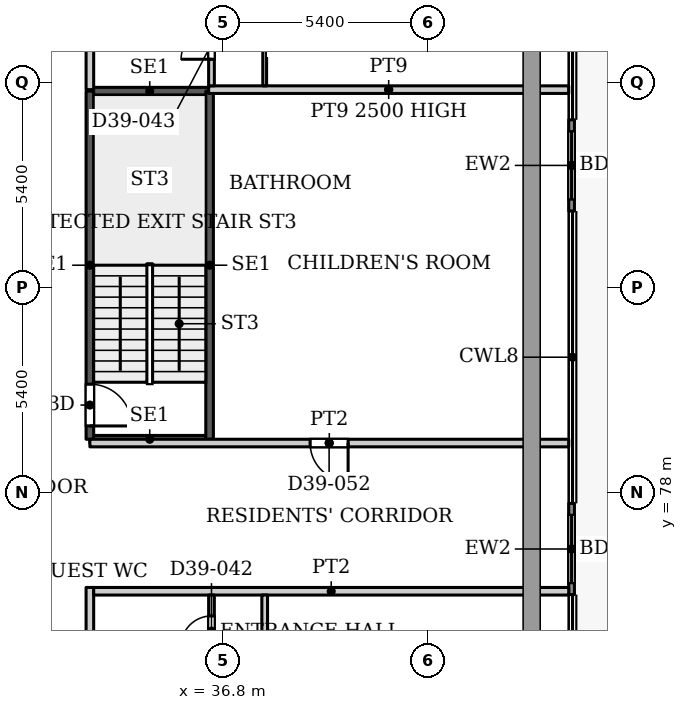
"""IFC4 building model, lengths in metres.
Left out: names, types, materials, properties, quantities, classifications, styles, units other than length and angle.
Written with IfcOpenShell. Run it as: python <this file> out.ifc"""

import sys

from ifc_helpers import new_model, si_unit, direction, frame, frame_2d, origin, place, context, subcontext, project, spatial, rectangle, extrude, source, transform, mapped, element, fill, save


model = new_model("IFC4")
c1 = context("Model", 3, precision=1e-05, world=origin(), true_north=direction((0.0, 1.0)))
c2 = subcontext(c1, "Body", "Model", "MODEL_VIEW")
j1 = project(units=[si_unit("LENGTHUNIT", "METRE"), si_unit("PLANEANGLEUNIT", "RADIAN")], contexts=[c1])
p1 = place(None, origin())
s1 = spatial("IfcSite", under=j1, at=p1, CompositionType="ELEMENT")
p2 = place(p1, origin())
s2 = spatial("IfcBuilding", under=s1, at=p2, CompositionType="ELEMENT")
p3 = place(p2, frame((0.0, 0.0, 172.1)))
s3 = spatial("IfcBuildingStorey", under=s2, at=p3, CompositionType="ELEMENT", Elevation=172.1)
p4 = place(p3, frame((45.975, 87.806, 0.0), z_axis=(0.0, 0.0, 1.0), x_axis=(0.0, -1.0, 0.0)))
e1 = element("IfcWall", 1, at=p4, inside=s3, PredefinedType="SOLIDWALL", context=c2, shape_type="SweptSolid", body=[
    extrude(rectangle(XDim=2.4, YDim=0.15, at=frame_2d((1.2, 0.0))), origin(), (0.0, 0.0, 1.0), 3.75),
])
p5 = place(p4, frame((0.3, 0.0, 0.0)))
e2 = element("IfcOpeningElement", 2, at=p5, cuts=e1, PredefinedType="OPENING", context=c2, shape_type="SweptSolid", body=[
    extrude(rectangle(XDim=1.8, YDim=2.4, at=frame_2d((0.9, 1.2))), frame((0.0, 0.085, 0.0), z_axis=(0.0, -1.0, 0.0), x_axis=(1.0, 0.0, 0.0)), (0.0, 0.0, 1.0), 0.17),
])
p6 = place(p3, frame((45.975, 77.712, 0.0), z_axis=(0.0, 0.0, 1.0), x_axis=(0.0, -1.0, 0.0)))
e3 = element("IfcWall", 3, at=p6, inside=s3, PredefinedType="SOLIDWALL", context=c2, shape_type="SweptSolid", body=[
    extrude(rectangle(XDim=2.4, YDim=0.15, at=frame_2d((1.2, 0.0))), origin(), (0.0, 0.0, 1.0), 3.75),
])
p7 = place(p6, frame((0.3, 0.0, 0.0)))
e4 = element("IfcOpeningElement", 4, at=p7, cuts=e3, PredefinedType="OPENING", context=c2, shape_type="SweptSolid", body=[
    extrude(rectangle(XDim=1.8, YDim=2.4, at=frame_2d((0.9, 1.2))), frame((0.0, 0.085, 0.0), z_axis=(0.0, -1.0, 0.0), x_axis=(1.0, 0.0, 0.0)), (0.0, 0.0, 1.0), 0.17),
])
for number, where, z_axis, x_axis in (
    (5, (33.3, 79.4, 0.0), (0.0, 0.0, 1.0), (1.0, 0.0, 0.0)),
    (6, (33.3, 88.56, 0.0), (0.0, 0.0, 1.0), (1.0, 0.0, 0.0)),
):
    element("IfcWall", number, at=place(p3, frame(where, z_axis=z_axis, x_axis=x_axis)), inside=s3, PredefinedType="SHEAR", context=c2, shape_type="SweptSolid", body=[
        extrude(rectangle(XDim=3.15, YDim=0.2, at=frame_2d((1.575, 0.0))), origin(), (0.0, 0.0, 1.0), 3.9),
    ])
p8 = place(p3, frame((33.3, 79.4, 0.0), z_axis=(0.0, 0.0, 1.0), x_axis=(0.0, 1.0, 0.0)))
e7 = element("IfcWall", 7, at=p8, inside=s3, PredefinedType="SHEAR", context=c2, shape_type="SweptSolid", body=[
    extrude(rectangle(XDim=9.16, YDim=0.2, at=frame_2d((4.58, 0.0))), origin(), (0.0, 0.0, 1.0), 3.9),
])
p9 = place(p8, frame((0.35, 0.0, 0.0)))
e8 = element("IfcOpeningElement", 8, at=p9, cuts=e7, PredefinedType="OPENING", context=c2, shape_type="SweptSolid", body=[
    extrude(rectangle(XDim=1.1, YDim=2.2, at=frame_2d((0.55, 1.1))), frame((0.0, 0.11, 0.0), z_axis=(0.0, -1.0, 0.0), x_axis=(1.0, 0.0, 0.0)), (0.0, 0.0, 1.0), 0.22),
])
p10 = place(p3, frame((36.45, 79.4, 0.0), z_axis=(0.0, 0.0, 1.0), x_axis=(0.0, 1.0, 0.0)))
e9 = element("IfcWall", 9, at=p10, inside=s3, PredefinedType="SHEAR", context=c2, shape_type="SweptSolid", body=[
    extrude(rectangle(XDim=9.16, YDim=0.2, at=frame_2d((4.58, 0.0))), origin(), (0.0, 0.0, 1.0), 3.9),
])
p11 = place(p3, frame((33.3, 57.9, 0.0), z_axis=(0.0, 0.0, 1.0), x_axis=(0.0, 1.0, 0.0)))
e10 = element("IfcWall", 10, at=p11, inside=s3, PredefinedType="PARTITIONING", context=c2, shape_type="SweptSolid", body=[
    extrude(rectangle(XDim=17.6, YDim=0.2, at=frame_2d((8.8, 0.0))), origin(), (0.0, 0.0, 1.0), 3.6),
])
p12 = place(p11, frame((6.8, 0.0, 0.0)))
e11 = element("IfcOpeningElement", 11, at=p12, cuts=e10, PredefinedType="OPENING", context=c2, shape_type="SweptSolid", body=[
    extrude(rectangle(XDim=1.0, YDim=2.1, at=frame_2d((0.5, 1.05))), frame((0.0, 0.11, 0.0), z_axis=(0.0, -1.0, 0.0), x_axis=(1.0, 0.0, 0.0)), (0.0, 0.0, 1.0), 0.22),
])
p13 = place(p3, frame((33.3, 79.3, 0.0), z_axis=(0.0, 0.0, 1.0), x_axis=(1.0, 0.0, 0.0)))
e12 = element("IfcWall", 12, at=p13, inside=s3, PredefinedType="PARTITIONING", context=c2, shape_type="SweptSolid", body=[
    extrude(rectangle(XDim=12.6, YDim=0.2, at=frame_2d((6.3, 0.0))), origin(), (0.0, 0.0, 1.0), 3.6),
])
p14 = place(p13, frame((5.795, 0.0, 0.0)))
e13 = element("IfcOpeningElement", 13, at=p14, cuts=e12, PredefinedType="OPENING", context=c2, shape_type="SweptSolid", body=[
    extrude(rectangle(XDim=1.0, YDim=2.1, at=frame_2d((0.5, 1.05))), frame((0.0, 0.11, 0.0), z_axis=(0.0, -1.0, 0.0), x_axis=(1.0, 0.0, 0.0)), (0.0, 0.0, 1.0), 0.22),
])
p15 = place(p3, frame((33.3, 88.6, 0.0), z_axis=(0.0, 0.0, 1.0), x_axis=(0.0, 1.0, 0.0)))
e14 = element("IfcWall", 14, at=p15, inside=s3, PredefinedType="PARTITIONING", context=c2, shape_type="SweptSolid", body=[
    extrude(rectangle(XDim=5.5, YDim=0.2, at=frame_2d((2.75, 0.0))), origin(), (0.0, 0.0, 1.0), 3.6),
])
p16 = place(p15, frame((2.8, 0.0, 0.0)))
e15 = element("IfcOpeningElement", 15, at=p16, cuts=e14, PredefinedType="OPENING", context=c2, shape_type="SweptSolid", body=[
    extrude(rectangle(XDim=1.0, YDim=2.1, at=frame_2d((0.5, 1.05))), frame((0.0, 0.11, 0.0), z_axis=(0.0, -1.0, 0.0), x_axis=(1.0, 0.0, 0.0)), (0.0, 0.0, 1.0), 0.22),
])
p17 = place(p3, frame((33.4, 75.4, 0.0), z_axis=(0.0, 0.0, 1.0), x_axis=(1.0, 0.0, 0.0)))
e16 = element("IfcWall", 16, at=p17, inside=s3, PredefinedType="PARTITIONING", context=c2, shape_type="SweptSolid", body=[
    extrude(rectangle(XDim=12.5, YDim=0.2, at=frame_2d((6.25, 0.0))), origin(), (0.0, 0.0, 1.0), 3.6),
])
p18 = place(p3, frame((36.425, 88.6, 0.0), z_axis=(0.0, 0.0, 1.0), x_axis=(1.0, 0.0, 0.0)))
e17 = element("IfcWall", 17, at=p18, inside=s3, PredefinedType="PARTITIONING", context=c2, shape_type="SweptSolid", body=[
    extrude(rectangle(XDim=9.475, YDim=0.2, at=frame_2d((4.737, 0.0))), origin(), (0.0, 0.0, 1.0), 2.5),
])
p19 = place(p3, frame((36.5, 66.65, 0.0), z_axis=(0.0, 0.0, 1.0), x_axis=(0.0, 1.0, 0.0)))
e18 = element("IfcWall", 18, at=p19, inside=s3, PredefinedType="PARTITIONING", context=c2, shape_type="SweptSolid", body=[
    extrude(rectangle(XDim=8.65, YDim=0.15, at=frame_2d((4.325, 0.0))), origin(), (0.0, 0.0, 1.0), 3.6),
])
p20 = place(p19, frame((4.9, 0.0, 0.0)))
e19 = element("IfcOpeningElement", 19, at=p20, cuts=e18, PredefinedType="OPENING", context=c2, shape_type="SweptSolid", body=[
    extrude(rectangle(XDim=0.8, YDim=2.1, at=frame_2d((0.4, 1.05))), frame((0.0, 0.085, 0.0), z_axis=(0.0, -1.0, 0.0), x_axis=(1.0, 0.0, 0.0)), (0.0, 0.0, 1.0), 0.17),
])
p21 = place(p19, frame((1.55, 0.0, 0.0)))
e20 = element("IfcOpeningElement", 20, at=p21, cuts=e18, PredefinedType="OPENING", context=c2, shape_type="SweptSolid", body=[
    extrude(rectangle(XDim=0.9, YDim=2.1, at=frame_2d((0.45, 1.05))), frame((0.0, 0.085, 0.0), z_axis=(0.0, -1.0, 0.0), x_axis=(1.0, 0.0, 0.0)), (0.0, 0.0, 1.0), 0.17),
])
p22 = place(p19, frame((7.3, 0.0, 0.0)))
e21 = element("IfcOpeningElement", 21, at=p22, cuts=e18, PredefinedType="OPENING", context=c2, shape_type="SweptSolid", body=[
    extrude(rectangle(XDim=0.8, YDim=2.1, at=frame_2d((0.4, 1.05))), frame((0.0, 0.085, 0.0), z_axis=(0.0, -1.0, 0.0), x_axis=(1.0, 0.0, 0.0)), (0.0, 0.0, 1.0), 0.17),
])
p23 = place(p3, frame((36.5, 88.7, 0.0), z_axis=(0.0, 0.0, 1.0), x_axis=(0.0, 1.0, 0.0)))
e22 = element("IfcWall", 22, at=p23, inside=s3, PredefinedType="PARTITIONING", context=c2, shape_type="SweptSolid", body=[
    extrude(rectangle(XDim=2.225, YDim=0.15, at=frame_2d((1.113, 0.0))), origin(), (0.0, 0.0, 1.0), 3.6),
])
p24 = place(p23, frame((0.7, 0.0, 0.0)))
e23 = element("IfcOpeningElement", 23, at=p24, cuts=e22, PredefinedType="OPENING", context=c2, shape_type="SweptSolid", body=[
    extrude(rectangle(XDim=0.8, YDim=2.1, at=frame_2d((0.4, 1.05))), frame((0.0, 0.085, 0.0), z_axis=(0.0, -1.0, 0.0), x_axis=(1.0, 0.0, 0.0)), (0.0, 0.0, 1.0), 0.17),
])
p25 = place(p3, frame((37.9, 58.1, 0.0), z_axis=(0.0, 0.0, 1.0), x_axis=(0.0, 1.0, 0.0)))
e24 = element("IfcWall", 24, at=p25, inside=s3, PredefinedType="PARTITIONING", context=c2, shape_type="SweptSolid", body=[
    extrude(rectangle(XDim=17.2, YDim=0.15, at=frame_2d((8.6, 0.0))), origin(), (0.0, 0.0, 1.0), 3.6),
])
p26 = place(p25, frame((1.1, 0.0, 0.0)))
e25 = element("IfcOpeningElement", 25, at=p26, cuts=e24, PredefinedType="OPENING", context=c2, shape_type="SweptSolid", body=[
    extrude(rectangle(XDim=0.9, YDim=2.1, at=frame_2d((0.45, 1.05))), frame((0.0, 0.085, 0.0), z_axis=(0.0, -1.0, 0.0), x_axis=(1.0, 0.0, 0.0)), (0.0, 0.0, 1.0), 0.17),
])
p27 = place(p25, frame((8.15, 0.0, 0.0)))
e26 = element("IfcOpeningElement", 26, at=p27, cuts=e24, PredefinedType="OPENING", context=c2, shape_type="SweptSolid", body=[
    extrude(rectangle(XDim=0.9, YDim=2.1, at=frame_2d((0.45, 1.05))), frame((0.0, 0.085, 0.0), z_axis=(0.0, -1.0, 0.0), x_axis=(1.0, 0.0, 0.0)), (0.0, 0.0, 1.0), 0.17),
])
p28 = place(p25, frame((14.85, 0.0, 0.0)))
e27 = element("IfcOpeningElement", 27, at=p28, cuts=e24, PredefinedType="OPENING", context=c2, shape_type="SweptSolid", body=[
    extrude(rectangle(XDim=1.0, YDim=2.1, at=frame_2d((0.5, 1.05))), frame((0.0, 0.085, 0.0), z_axis=(0.0, -1.0, 0.0), x_axis=(1.0, 0.0, 0.0)), (0.0, 0.0, 1.0), 0.17),
])
p29 = place(p25, frame((10.95, 0.0, 0.0)))
e28 = element("IfcOpeningElement", 28, at=p29, cuts=e24, PredefinedType="OPENING", context=c2, shape_type="SweptSolid", body=[
    extrude(rectangle(XDim=1.6, YDim=2.1, at=frame_2d((0.8, 1.05))), frame((0.0, 0.085, 0.0), z_axis=(0.0, -1.0, 0.0), x_axis=(1.0, 0.0, 0.0)), (0.0, 0.0, 1.0), 0.17),
])
p30 = place(p25, frame((5.75, 0.0, 0.0)))
e29 = element("IfcOpeningElement", 29, at=p30, cuts=e24, PredefinedType="OPENING", context=c2, shape_type="SweptSolid", body=[
    extrude(rectangle(XDim=0.9, YDim=2.1, at=frame_2d((0.45, 1.05))), frame((0.0, 0.085, 0.0), z_axis=(0.0, -1.0, 0.0), x_axis=(1.0, 0.0, 0.0)), (0.0, 0.0, 1.0), 0.17),
])
p31 = place(p3, frame((37.9, 88.7, 0.0), z_axis=(0.0, 0.0, 1.0), x_axis=(0.0, 1.0, 0.0)))
e30 = element("IfcWall", 30, at=p31, inside=s3, PredefinedType="PARTITIONING", context=c2, shape_type="SweptSolid", body=[
    extrude(rectangle(XDim=9.2, YDim=0.1, at=frame_2d((4.6, 0.0))), origin(), (0.0, 0.0, 1.0), 3.6),
])
p32 = place(p31, frame((1.4, 0.0, 0.0)))
e31 = element("IfcOpeningElement", 31, at=p32, cuts=e30, PredefinedType="OPENING", context=c2, shape_type="SweptSolid", body=[
    extrude(rectangle(XDim=0.9, YDim=2.1, at=frame_2d((0.45, 1.05))), frame((0.0, 0.06, 0.0), z_axis=(0.0, -1.0, 0.0), x_axis=(1.0, 0.0, 0.0)), (0.0, 0.0, 1.0), 0.12),
])
p33 = place(p31, frame((6.0, 0.0, 0.0)))
e32 = element("IfcOpeningElement", 32, at=p33, cuts=e30, PredefinedType="OPENING", context=c2, shape_type="SweptSolid", body=[
    extrude(rectangle(XDim=1.0, YDim=2.1, at=frame_2d((0.5, 1.05))), frame((0.0, 0.06, 0.0), z_axis=(0.0, -1.0, 0.0), x_axis=(1.0, 0.0, 0.0)), (0.0, 0.0, 1.0), 0.12),
])
m1 = source(origin(), c2, "Body", "SweptSolid", [
    extrude(rectangle(XDim=1.8, YDim=2.4, at=frame_2d((0.9, 1.2))), frame((0.0, 0.025, 0.0), z_axis=(0.0, -1.0, 0.0), x_axis=(1.0, 0.0, 0.0)), (0.0, 0.0, 1.0), 0.05),
])
p34 = place(p5, origin())
e33 = element("IfcDoor", 33, at=p34, inside=s3, OperationType="SLIDING_TO_LEFT", PredefinedType="DOOR", context=c2, shape_type="MappedRepresentation", body=[
    mapped(m1, transform((0.0, 0.0, 0.0), x_axis=(1.0, 0.0, 0.0), y_axis=(0.0, 1.0, 0.0), z_axis=(0.0, 0.0, 1.0), scale=1.0)),
])
fill(e2, e33)
p35 = place(p7, origin())
e34 = element("IfcDoor", 34, at=p35, inside=s3, OperationType="SLIDING_TO_LEFT", PredefinedType="DOOR", context=c2, shape_type="MappedRepresentation", body=[
    mapped(m1, transform((0.0, 0.0, 0.0), x_axis=(1.0, 0.0, 0.0), y_axis=(0.0, 1.0, 0.0), z_axis=(0.0, 0.0, 1.0), scale=1.0)),
])
fill(e4, e34)
m2 = source(origin(), c2, "Body", "SweptSolid", [
    extrude(rectangle(XDim=1.1, YDim=2.2, at=frame_2d((0.55, 1.1))), frame((0.0, 0.025, 0.0), z_axis=(0.0, -1.0, 0.0), x_axis=(1.0, 0.0, 0.0)), (0.0, 0.0, 1.0), 0.05),
])
p36 = place(p9, origin())
e35 = element("IfcDoor", 35, at=p36, inside=s3, OperationType="SINGLE_SWING_RIGHT", PredefinedType="DOOR", context=c2, shape_type="MappedRepresentation", body=[
    mapped(m2, transform((0.0, 0.0, 0.0), x_axis=(1.0, 0.0, 0.0), y_axis=(0.0, 1.0, 0.0), z_axis=(0.0, 0.0, 1.0), scale=1.0)),
])
fill(e8, e35)
m3 = source(origin(), c2, "Body", "SweptSolid", [
    extrude(rectangle(XDim=0.8, YDim=2.1, at=frame_2d((0.4, 1.05))), frame((0.0, 0.025, 0.0), z_axis=(0.0, -1.0, 0.0), x_axis=(1.0, 0.0, 0.0)), (0.0, 0.0, 1.0), 0.05),
])
p37 = place(p22, origin())
e36 = element("IfcDoor", 36, at=p37, inside=s3, OperationType="SINGLE_SWING_LEFT", PredefinedType="DOOR", context=c2, shape_type="MappedRepresentation", body=[
    mapped(m3, transform((0.0, 0.0, 0.0), x_axis=(1.0, 0.0, 0.0), y_axis=(0.0, 1.0, 0.0), z_axis=(0.0, 0.0, 1.0), scale=1.0)),
])
fill(e21, e36)
p38 = place(p24, origin())
e37 = element("IfcDoor", 37, at=p38, inside=s3, OperationType="SINGLE_SWING_LEFT", PredefinedType="DOOR", context=c2, shape_type="MappedRepresentation", body=[
    mapped(m3, transform((0.0, 0.0, 0.0), x_axis=(1.0, 0.0, 0.0), y_axis=(0.0, 1.0, 0.0), z_axis=(0.0, 0.0, 1.0), scale=1.0)),
])
fill(e23, e37)
m4 = source(origin(), c2, "Body", "SweptSolid", [
    extrude(rectangle(XDim=1.0, YDim=2.1, at=frame_2d((0.5, 1.05))), frame((0.0, 0.025, 0.0), z_axis=(0.0, -1.0, 0.0), x_axis=(1.0, 0.0, 0.0)), (0.0, 0.0, 1.0), 0.05),
])
p39 = place(p14, origin())
e38 = element("IfcDoor", 38, at=p39, inside=s3, OperationType="SINGLE_SWING_RIGHT", PredefinedType="DOOR", context=c2, shape_type="MappedRepresentation", body=[
    mapped(m4, transform((0.0, 0.0, 0.0), x_axis=(1.0, 0.0, 0.0), y_axis=(0.0, 1.0, 0.0), z_axis=(0.0, 0.0, 1.0), scale=1.0)),
])
fill(e13, e38)
save(model, sys.argv[1])
